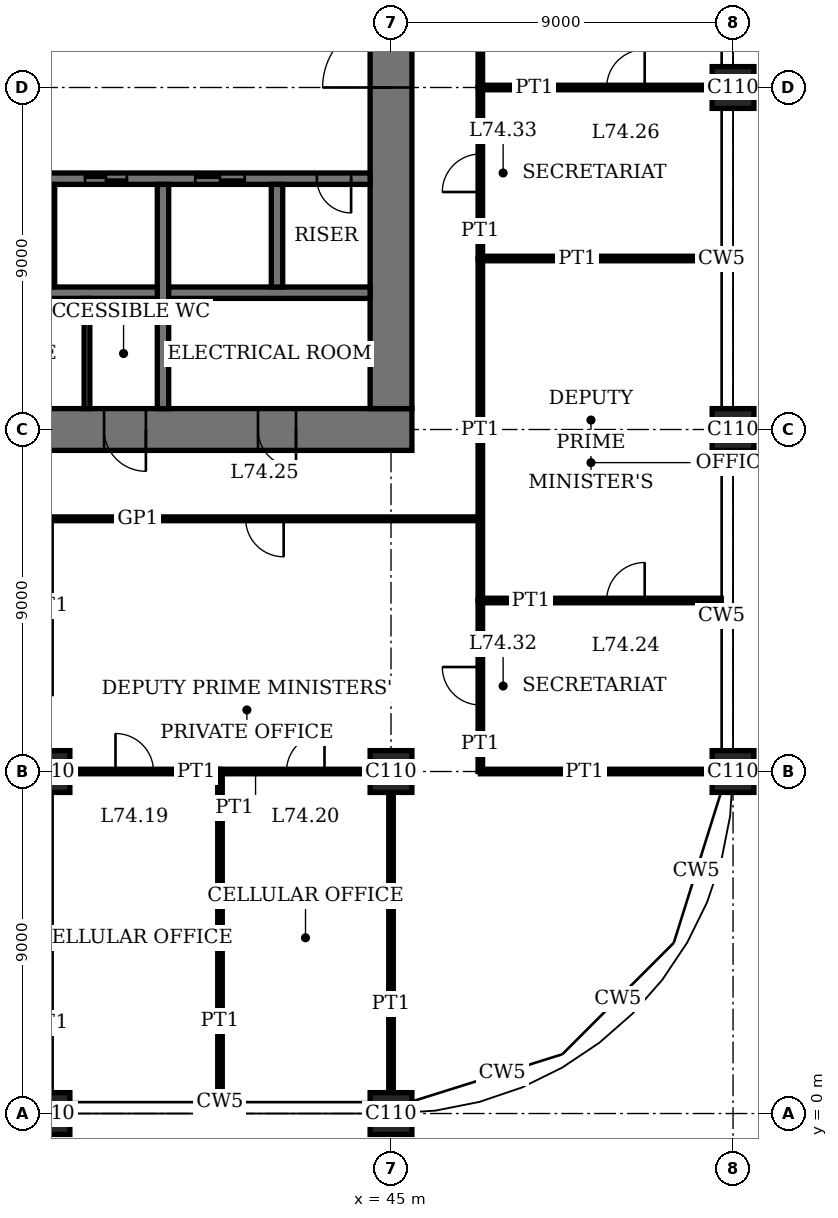
"""IFC4 building model, lengths in metres.
Left out: names, types, materials, properties, quantities, classifications, styles, units other than length and angle.
Written with IfcOpenShell. Run it as: python <this file> out.ifc"""

import sys

from ifc_helpers import new_model, si_unit, direction, frame, frame_2d, origin, origin_2d, place, context, subcontext, project, spatial, rectangle, extrude, element, fill, save


model = new_model("IFC4")
c1 = context("Model", 3, precision=1e-05, world=origin(), true_north=direction((0.0, 1.0)))
c2 = subcontext(c1, "Body", "Model", "MODEL_VIEW")
j1 = project(units=[si_unit("LENGTHUNIT", "METRE"), si_unit("PLANEANGLEUNIT", "RADIAN")], contexts=[c1])
p1 = place(None, origin())
s1 = spatial("IfcSite", under=j1, at=p1, CompositionType="ELEMENT")
p2 = place(p1, origin())
s2 = spatial("IfcBuilding", under=s1, at=p2, CompositionType="ELEMENT")
p3 = place(p2, frame((0.0, 0.0, 303.4)))
s3 = spatial("IfcBuildingStorey", under=s2, at=p3, CompositionType="ELEMENT", Elevation=303.4)
for number, where, z_axis, x_axis in (
    (1, (36.0, 0.0, 0.0), (0.0, 0.0, 1.0), (1.0, 0.0, 0.0)),
    (2, (36.0, 9.0, 0.0), (0.0, 0.0, 1.0), (1.0, 0.0, 0.0)),
    (3, (45.0, 0.0, 0.0), (0.0, 0.0, 1.0), (1.0, 0.0, 0.0)),
    (4, (45.0, 9.0, 0.0), (0.0, 0.0, 1.0), (1.0, 0.0, 0.0)),
    (5, (54.0, 9.0, 0.0), (0.0, 0.0, 1.0), (1.0, 0.0, 0.0)),
    (6, (54.0, 18.0, 0.0), (0.0, 0.0, 1.0), (1.0, 0.0, 0.0)),
    (7, (54.0, 27.0, 0.0), (0.0, 0.0, 1.0), (1.0, 0.0, 0.0)),
):
    element("IfcColumn", number, at=place(p3, frame(where, z_axis=z_axis, x_axis=x_axis)), inside=s3, PredefinedType="COLUMN", context=c2, shape_type="SweptSolid", body=[
        extrude(rectangle(XDim=1.1, YDim=1.1, at=origin_2d()), origin(), (0.0, 0.0, 1.0), 4.0),
    ])
p4 = place(p3, frame((17.45, 18.0, 0.0), z_axis=(0.0, 0.0, 1.0), x_axis=(1.0, 0.0, 0.0)))
e8 = element("IfcWall", 8, at=p4, inside=s3, PredefinedType="SHEAR", context=c2, shape_type="SweptSolid", body=[
    extrude(rectangle(XDim=28.1, YDim=1.1, at=frame_2d((14.05, 0.0))), origin(), (0.0, 0.0, 1.0), 4.0),
])
p5 = place(p4, frame((11.55, 0.0, 0.0)))
e9 = element("IfcOpeningElement", 9, at=p5, cuts=e8, PredefinedType="OPENING", context=c2, shape_type="SweptSolid", body=[
    extrude(rectangle(XDim=1.0, YDim=2.4, at=frame_2d((0.5, 1.2))), frame((0.0, 0.56, 0.0), z_axis=(0.0, -1.0, 0.0), x_axis=(1.0, 0.0, 0.0)), (0.0, 0.0, 1.0), 1.12),
])
p6 = place(p4, frame((16.55, 0.0, 0.0)))
e10 = element("IfcOpeningElement", 10, at=p6, cuts=e8, PredefinedType="OPENING", context=c2, shape_type="SweptSolid", body=[
    extrude(rectangle(XDim=1.0, YDim=2.4, at=frame_2d((0.5, 1.2))), frame((0.0, 0.56, 0.0), z_axis=(0.0, -1.0, 0.0), x_axis=(1.0, 0.0, 0.0)), (0.0, 0.0, 1.0), 1.12),
])
p7 = place(p4, frame((20.0, 0.0, 0.0)))
e11 = element("IfcOpeningElement", 11, at=p7, cuts=e8, PredefinedType="OPENING", context=c2, shape_type="SweptSolid", body=[
    extrude(rectangle(XDim=1.1, YDim=2.4, at=frame_2d((0.55, 1.2))), frame((0.0, 0.56, 0.0), z_axis=(0.0, -1.0, 0.0), x_axis=(1.0, 0.0, 0.0)), (0.0, 0.0, 1.0), 1.12),
])
p8 = place(p4, frame((24.05, 0.0, 0.0)))
e12 = element("IfcOpeningElement", 12, at=p8, cuts=e8, PredefinedType="OPENING", context=c2, shape_type="SweptSolid", body=[
    extrude(rectangle(XDim=1.0, YDim=2.4, at=frame_2d((0.5, 1.2))), frame((0.0, 0.56, 0.0), z_axis=(0.0, -1.0, 0.0), x_axis=(1.0, 0.0, 0.0)), (0.0, 0.0, 1.0), 1.12),
])
p9 = place(p3, frame((45.0, 18.55, 0.0), z_axis=(0.0, 0.0, 1.0), x_axis=(0.0, 1.0, 0.0)))
e13 = element("IfcWall", 13, at=p9, inside=s3, PredefinedType="SHEAR", context=c2, shape_type="SweptSolid", body=[
    extrude(rectangle(XDim=16.9, YDim=1.1, at=frame_2d((8.45, 0.0))), origin(), (0.0, 0.0, 1.0), 4.0),
])
p10 = place(p9, frame((8.45, 0.0, 0.0)))
e14 = element("IfcOpeningElement", 14, at=p10, cuts=e13, PredefinedType="OPENING", context=c2, shape_type="SweptSolid", body=[
    extrude(rectangle(XDim=1.8, YDim=2.4, at=frame_2d((0.9, 1.2))), frame((0.0, 0.56, 0.0), z_axis=(0.0, -1.0, 0.0), x_axis=(1.0, 0.0, 0.0)), (0.0, 0.0, 1.0), 1.12),
])
p11 = place(p3, frame((18.55, 24.6, 0.0), z_axis=(0.0, 0.0, 1.0), x_axis=(1.0, 0.0, 0.0)))
e15 = element("IfcWall", 15, at=p11, inside=s3, PredefinedType="SHEAR", context=c2, shape_type="SweptSolid", body=[
    extrude(rectangle(XDim=25.9, YDim=0.3, at=frame_2d((12.95, 0.0))), origin(), (0.0, 0.0, 1.0), 4.0),
])
p12 = place(p11, frame((4.95, 0.0, 0.0)))
e16 = element("IfcOpeningElement", 16, at=p12, cuts=e15, PredefinedType="OPENING", context=c2, shape_type="SweptSolid", body=[
    extrude(rectangle(XDim=1.0, YDim=2.4, at=frame_2d((0.5, 1.2))), frame((0.0, 0.16, 0.0), z_axis=(0.0, -1.0, 0.0), x_axis=(1.0, 0.0, 0.0)), (0.0, 0.0, 1.0), 0.32),
])
p13 = place(p11, frame((24.5, 0.0, 0.0)))
e17 = element("IfcOpeningElement", 17, at=p13, cuts=e15, PredefinedType="OPENING", context=c2, shape_type="SweptSolid", body=[
    extrude(rectangle(XDim=0.9, YDim=2.1, at=frame_2d((0.45, 1.05))), frame((0.0, 0.16, 0.0), z_axis=(0.0, -1.0, 0.0), x_axis=(1.0, 0.0, 0.0)), (0.0, 0.0, 1.0), 0.32),
])
p14 = place(p11, frame((9.4, 0.0, 0.0)))
e18 = element("IfcOpeningElement", 18, at=p14, cuts=e15, PredefinedType="OPENING", context=c2, shape_type="SweptSolid", body=[
    extrude(rectangle(XDim=1.1, YDim=2.4, at=frame_2d((0.55, 1.2))), frame((0.0, 0.16, 0.0), z_axis=(0.0, -1.0, 0.0), x_axis=(1.0, 0.0, 0.0)), (0.0, 0.0, 1.0), 0.32),
])
p15 = place(p11, frame((12.4, 0.0, 0.0)))
e19 = element("IfcOpeningElement", 19, at=p15, cuts=e15, PredefinedType="OPENING", context=c2, shape_type="SweptSolid", body=[
    extrude(rectangle(XDim=1.1, YDim=2.4, at=frame_2d((0.55, 1.2))), frame((0.0, 0.16, 0.0), z_axis=(0.0, -1.0, 0.0), x_axis=(1.0, 0.0, 0.0)), (0.0, 0.0, 1.0), 0.32),
])
p16 = place(p11, frame((15.4, 0.0, 0.0)))
e20 = element("IfcOpeningElement", 20, at=p16, cuts=e15, PredefinedType="OPENING", context=c2, shape_type="SweptSolid", body=[
    extrude(rectangle(XDim=1.1, YDim=2.4, at=frame_2d((0.55, 1.2))), frame((0.0, 0.16, 0.0), z_axis=(0.0, -1.0, 0.0), x_axis=(1.0, 0.0, 0.0)), (0.0, 0.0, 1.0), 0.32),
])
p17 = place(p11, frame((18.4, 0.0, 0.0)))
e21 = element("IfcOpeningElement", 21, at=p17, cuts=e15, PredefinedType="OPENING", context=c2, shape_type="SweptSolid", body=[
    extrude(rectangle(XDim=1.1, YDim=2.4, at=frame_2d((0.55, 1.2))), frame((0.0, 0.16, 0.0), z_axis=(0.0, -1.0, 0.0), x_axis=(1.0, 0.0, 0.0)), (0.0, 0.0, 1.0), 0.32),
])
p18 = place(p11, frame((21.3, 0.0, 0.0)))
e22 = element("IfcOpeningElement", 22, at=p18, cuts=e15, PredefinedType="OPENING", context=c2, shape_type="SweptSolid", body=[
    extrude(rectangle(XDim=1.3, YDim=2.4, at=frame_2d((0.65, 1.2))), frame((0.0, 0.16, 0.0), z_axis=(0.0, -1.0, 0.0), x_axis=(1.0, 0.0, 0.0)), (0.0, 0.0, 1.0), 0.32),
])
p19 = place(p3, frame((27.15, 21.6, 0.0), z_axis=(0.0, 0.0, 1.0), x_axis=(1.0, 0.0, 0.0)))
e23 = element("IfcWall", 23, at=p19, inside=s3, PredefinedType="SHEAR", context=c2, shape_type="SweptSolid", body=[
    extrude(rectangle(XDim=17.3, YDim=0.3, at=frame_2d((8.65, 0.0))), origin(), (0.0, 0.0, 1.0), 4.0),
])
p20 = place(p3, frame((36.0, 21.75, 0.0), z_axis=(0.0, 0.0, 1.0), x_axis=(0.0, 1.0, 0.0)))
e24 = element("IfcWall", 24, at=p20, inside=s3, PredefinedType="SHEAR", context=c2, shape_type="SweptSolid", body=[
    extrude(rectangle(XDim=2.7, YDim=0.3, at=frame_2d((1.35, 0.0))), origin(), (0.0, 0.0, 1.0), 4.0),
])
p21 = place(p3, frame((39.0, 18.55, 0.0), z_axis=(0.0, 0.0, 1.0), x_axis=(0.0, 1.0, 0.0)))
e25 = element("IfcWall", 25, at=p21, inside=s3, PredefinedType="SHEAR", context=c2, shape_type="SweptSolid", body=[
    extrude(rectangle(XDim=5.9, YDim=0.3, at=frame_2d((2.95, 0.0))), origin(), (0.0, 0.0, 1.0), 4.0),
])
p22 = place(p3, frame((42.0, 21.75, 0.0), z_axis=(0.0, 0.0, 1.0), x_axis=(0.0, 1.0, 0.0)))
e26 = element("IfcWall", 26, at=p22, inside=s3, PredefinedType="SHEAR", context=c2, shape_type="SweptSolid", body=[
    extrude(rectangle(XDim=2.7, YDim=0.3, at=frame_2d((1.35, 0.0))), origin(), (0.0, 0.0, 1.0), 4.0),
])
p23 = place(p3, frame((47.35, 9.0, 0.0), z_axis=(0.0, 0.0, 1.0), x_axis=(1.0, 0.0, 0.0)))
e27 = element("IfcWall", 27, at=p23, inside=s3, PredefinedType="PARTITIONING", context=c2, shape_type="SweptSolid", body=[
    extrude(rectangle(XDim=6.1, YDim=0.12, at=frame_2d((3.05, 0.0))), origin(), (0.0, 0.0, 1.0), 3.05),
])
p24 = place(p3, frame((36.55, 9.0, 0.0), z_axis=(0.0, 0.0, 1.0), x_axis=(1.0, 0.0, 0.0)))
e28 = element("IfcWall", 28, at=p24, inside=s3, PredefinedType="PARTITIONING", context=c2, shape_type="SweptSolid", body=[
    extrude(rectangle(XDim=3.95, YDim=0.12, at=frame_2d((1.975, 0.0))), origin(), (0.0, 0.0, 1.0), 3.05),
])
p25 = place(p24, frame((1.2, 0.0, 0.0)))
e29 = element("IfcOpeningElement", 29, at=p25, cuts=e28, PredefinedType="OPENING", context=c2, shape_type="SweptSolid", body=[
    extrude(rectangle(XDim=1.0, YDim=2.4, at=frame_2d((0.5, 1.2))), frame((0.0, 0.07, 0.0), z_axis=(0.0, -1.0, 0.0), x_axis=(1.0, 0.0, 0.0)), (0.0, 0.0, 1.0), 0.14),
])
p26 = place(p3, frame((40.5, 9.0, 0.0), z_axis=(0.0, 0.0, 1.0), x_axis=(1.0, 0.0, 0.0)))
e30 = element("IfcWall", 30, at=p26, inside=s3, PredefinedType="PARTITIONING", context=c2, shape_type="SweptSolid", body=[
    extrude(rectangle(XDim=3.95, YDim=0.12, at=frame_2d((1.975, 0.0))), origin(), (0.0, 0.0, 1.0), 3.05),
])
p27 = place(p26, frame((1.75, 0.0, 0.0)))
e31 = element("IfcOpeningElement", 31, at=p27, cuts=e30, PredefinedType="OPENING", context=c2, shape_type="SweptSolid", body=[
    extrude(rectangle(XDim=1.0, YDim=2.4, at=frame_2d((0.5, 1.2))), frame((0.0, 0.07, 0.0), z_axis=(0.0, -1.0, 0.0), x_axis=(1.0, 0.0, 0.0)), (0.0, 0.0, 1.0), 0.14),
])
p28 = place(p3, frame((47.35, 13.5, 0.0), z_axis=(0.0, 0.0, 1.0), x_axis=(1.0, 0.0, 0.0)))
e32 = element("IfcWall", 32, at=p28, inside=s3, PredefinedType="PARTITIONING", context=c2, shape_type="SweptSolid", body=[
    extrude(rectangle(XDim=6.34, YDim=0.12, at=frame_2d((3.17, 0.0))), origin(), (0.0, 0.0, 1.0), 3.1),
])
p29 = place(p28, frame((3.325, 0.0, 0.0)))
e33 = element("IfcOpeningElement", 33, at=p29, cuts=e32, PredefinedType="OPENING", context=c2, shape_type="SweptSolid", body=[
    extrude(rectangle(XDim=1.0, YDim=2.4, at=frame_2d((0.5, 1.2))), frame((0.0, 0.07, 0.0), z_axis=(0.0, -1.0, 0.0), x_axis=(1.0, 0.0, 0.0)), (0.0, 0.0, 1.0), 0.14),
])
p30 = place(p3, frame((36.01, 15.65, 0.0), z_axis=(0.0, 0.0, 1.0), x_axis=(1.0, 0.0, 0.0)))
e34 = element("IfcWall", 34, at=p30, inside=s3, PredefinedType="PARTITIONING", context=c2, shape_type="SweptSolid", body=[
    extrude(rectangle(XDim=11.33, YDim=0.1, at=frame_2d((5.665, 0.0))), origin(), (0.0, 0.0, 1.0), 3.75),
])
p31 = place(p30, frame((5.165, 0.0, 0.0)))
e35 = element("IfcOpeningElement", 35, at=p31, cuts=e34, PredefinedType="OPENING", context=c2, shape_type="SweptSolid", body=[
    extrude(rectangle(XDim=1.0, YDim=2.4, at=frame_2d((0.5, 1.2))), frame((0.0, 0.06, 0.0), z_axis=(0.0, -1.0, 0.0), x_axis=(1.0, 0.0, 0.0)), (0.0, 0.0, 1.0), 0.12),
])
p32 = place(p3, frame((47.35, 22.5, 0.0), z_axis=(0.0, 0.0, 1.0), x_axis=(1.0, 0.0, 0.0)))
e36 = element("IfcWall", 36, at=p32, inside=s3, PredefinedType="PARTITIONING", context=c2, shape_type="SweptSolid", body=[
    extrude(rectangle(XDim=6.34, YDim=0.12, at=frame_2d((3.17, 0.0))), origin(), (0.0, 0.0, 1.0), 3.1),
])
p33 = place(p3, frame((47.35, 27.0, 0.0), z_axis=(0.0, 0.0, 1.0), x_axis=(1.0, 0.0, 0.0)))
e37 = element("IfcWall", 37, at=p33, inside=s3, PredefinedType="PARTITIONING", context=c2, shape_type="SweptSolid", body=[
    extrude(rectangle(XDim=6.1, YDim=0.12, at=frame_2d((3.05, 0.0))), origin(), (0.0, 0.0, 1.0), 3.05),
])
p34 = place(p33, frame((3.325, 0.0, 0.0)))
e38 = element("IfcOpeningElement", 38, at=p34, cuts=e37, PredefinedType="OPENING", context=c2, shape_type="SweptSolid", body=[
    extrude(rectangle(XDim=1.0, YDim=2.4, at=frame_2d((0.5, 1.2))), frame((0.0, 0.07, 0.0), z_axis=(0.0, -1.0, 0.0), x_axis=(1.0, 0.0, 0.0)), (0.0, 0.0, 1.0), 0.14),
])
p35 = place(p3, frame((40.5, 0.31, 0.0), z_axis=(0.0, 0.0, 1.0), x_axis=(0.0, 1.0, 0.0)))
e39 = element("IfcWall", 39, at=p35, inside=s3, PredefinedType="PARTITIONING", context=c2, shape_type="SweptSolid", body=[
    extrude(rectangle(XDim=8.69, YDim=0.12, at=frame_2d((4.345, 0.0))), origin(), (0.0, 0.0, 1.0), 3.75),
])
p36 = place(p3, frame((45.0, 0.55, 0.0), z_axis=(0.0, 0.0, 1.0), x_axis=(0.0, 1.0, 0.0)))
e40 = element("IfcWall", 40, at=p36, inside=s3, PredefinedType="PARTITIONING", context=c2, shape_type="SweptSolid", body=[
    extrude(rectangle(XDim=7.9, YDim=0.12, at=frame_2d((3.95, 0.0))), origin(), (0.0, 0.0, 1.0), 3.05),
])
p37 = place(p3, frame((47.35, 9.0, 0.0), z_axis=(0.0, 0.0, 1.0), x_axis=(0.0, 1.0, 0.0)))
e41 = element("IfcWall", 41, at=p37, inside=s3, PredefinedType="PARTITIONING", context=c2, shape_type="SweptSolid", body=[
    extrude(rectangle(XDim=4.5, YDim=0.12, at=frame_2d((2.25, 0.0))), origin(), (0.0, 0.0, 1.0), 3.75),
])
p38 = place(p37, frame((1.75, 0.0, 0.0)))
e42 = element("IfcOpeningElement", 42, at=p38, cuts=e41, PredefinedType="OPENING", context=c2, shape_type="SweptSolid", body=[
    extrude(rectangle(XDim=1.0, YDim=2.4, at=frame_2d((0.5, 1.2))), frame((0.0, 0.07, 0.0), z_axis=(0.0, -1.0, 0.0), x_axis=(1.0, 0.0, 0.0)), (0.0, 0.0, 1.0), 0.14),
])
p39 = place(p3, frame((47.35, 13.5, 0.0), z_axis=(0.0, 0.0, 1.0), x_axis=(0.0, 1.0, 0.0)))
e43 = element("IfcWall", 43, at=p39, inside=s3, PredefinedType="PARTITIONING", context=c2, shape_type="SweptSolid", body=[
    extrude(rectangle(XDim=9.0, YDim=0.12, at=frame_2d((4.5, 0.0))), origin(), (0.0, 0.0, 1.0), 3.75),
])
p40 = place(p3, frame((47.35, 22.5, 0.0), z_axis=(0.0, 0.0, 1.0), x_axis=(0.0, 1.0, 0.0)))
e44 = element("IfcWall", 44, at=p40, inside=s3, PredefinedType="PARTITIONING", context=c2, shape_type="SweptSolid", body=[
    extrude(rectangle(XDim=4.5, YDim=0.12, at=frame_2d((2.25, 0.0))), origin(), (0.0, 0.0, 1.0), 3.75),
])
p41 = place(p40, frame((1.75, 0.0, 0.0)))
e45 = element("IfcOpeningElement", 45, at=p41, cuts=e44, PredefinedType="OPENING", context=c2, shape_type="SweptSolid", body=[
    extrude(rectangle(XDim=1.0, YDim=2.4, at=frame_2d((0.5, 1.2))), frame((0.0, 0.07, 0.0), z_axis=(0.0, -1.0, 0.0), x_axis=(1.0, 0.0, 0.0)), (0.0, 0.0, 1.0), 0.14),
])
p42 = place(p3, frame((47.35, 27.0, 0.0), z_axis=(0.0, 0.0, 1.0), x_axis=(0.0, 1.0, 0.0)))
e46 = element("IfcWall", 46, at=p42, inside=s3, PredefinedType="PARTITIONING", context=c2, shape_type="SweptSolid", body=[
    extrude(rectangle(XDim=9.0, YDim=0.12, at=frame_2d((4.5, 0.0))), origin(), (0.0, 0.0, 1.0), 3.75),
])
p43 = place(p3, frame((37.0, 18.55, 0.0), z_axis=(0.0, 0.0, 1.0), x_axis=(0.0, 1.0, 0.0)))
e47 = element("IfcWall", 47, at=p43, inside=s3, PredefinedType="PARTITIONING", context=c2, shape_type="SweptSolid", body=[
    extrude(rectangle(XDim=2.9, YDim=0.15, at=frame_2d((1.45, 0.0))), origin(), (0.0, 0.0, 1.0), 3.75),
])
p44 = place(p10, origin())
e48 = element("IfcDoor", 48, at=p44, inside=s3, OperationType="DOUBLE_DOOR_DOUBLE_SWING", PredefinedType="DOOR", context=c2, shape_type="SweptSolid", body=[
    extrude(rectangle(XDim=1.8, YDim=2.4, at=frame_2d((0.9, 1.2))), frame((0.0, 0.03, 0.0), z_axis=(0.0, -1.0, 0.0), x_axis=(1.0, 0.0, 0.0)), (0.0, 0.0, 1.0), 0.06),
    extrude(rectangle(XDim=0.04, YDim=2.4, at=frame_2d((0.02, 1.2))), frame((0.0, 0.55, 0.0), z_axis=(0.0, -1.0, 0.0), x_axis=(1.0, 0.0, 0.0)), (0.0, 0.0, 1.0), 1.1),
    extrude(rectangle(XDim=0.04, YDim=2.4, at=frame_2d((1.78, 1.2))), frame((0.0, 0.55, 0.0), z_axis=(0.0, -1.0, 0.0), x_axis=(1.0, 0.0, 0.0)), (0.0, 0.0, 1.0), 1.1),
    extrude(rectangle(XDim=1.8, YDim=0.04, at=frame_2d((0.9, 2.38))), frame((0.0, 0.55, 0.0), z_axis=(0.0, -1.0, 0.0), x_axis=(1.0, 0.0, 0.0)), (0.0, 0.0, 1.0), 1.1),
])
fill(e14, e48)
p45 = place(p7, origin())
e49 = element("IfcDoor", 49, at=p45, inside=s3, OperationType="SINGLE_SWING_RIGHT", PredefinedType="DOOR", context=c2, shape_type="SweptSolid", body=[
    extrude(rectangle(XDim=1.1, YDim=2.4, at=frame_2d((0.55, 1.2))), frame((0.0, 0.025, 0.0), z_axis=(0.0, -1.0, 0.0), x_axis=(1.0, 0.0, 0.0)), (0.0, 0.0, 1.0), 0.05),
    extrude(rectangle(XDim=0.04, YDim=2.4, at=frame_2d((0.02, 1.2))), frame((0.0, 0.44, 0.0), z_axis=(0.0, -1.0, 0.0), x_axis=(1.0, 0.0, 0.0)), (0.0, 0.0, 1.0), 0.88),
    extrude(rectangle(XDim=0.04, YDim=2.4, at=frame_2d((1.08, 1.2))), frame((0.0, 0.44, 0.0), z_axis=(0.0, -1.0, 0.0), x_axis=(1.0, 0.0, 0.0)), (0.0, 0.0, 1.0), 0.88),
    extrude(rectangle(XDim=1.1, YDim=0.04, at=frame_2d((0.55, 2.38))), frame((0.0, 0.44, 0.0), z_axis=(0.0, -1.0, 0.0), x_axis=(1.0, 0.0, 0.0)), (0.0, 0.0, 1.0), 0.88),
])
fill(e11, e49)
p46 = place(p8, origin())
e50 = element("IfcDoor", 50, at=p46, inside=s3, OperationType="SINGLE_SWING_RIGHT", PredefinedType="DOOR", context=c2, shape_type="SweptSolid", body=[
    extrude(rectangle(XDim=1.0, YDim=2.4, at=frame_2d((0.5, 1.2))), frame((0.0, 0.025, 0.0), z_axis=(0.0, -1.0, 0.0), x_axis=(1.0, 0.0, 0.0)), (0.0, 0.0, 1.0), 0.05),
    extrude(rectangle(XDim=0.04, YDim=2.4, at=frame_2d((0.02, 1.2))), frame((0.0, 0.4, 0.0), z_axis=(0.0, -1.0, 0.0), x_axis=(1.0, 0.0, 0.0)), (0.0, 0.0, 1.0), 0.8),
    extrude(rectangle(XDim=0.04, YDim=2.4, at=frame_2d((0.98, 1.2))), frame((0.0, 0.4, 0.0), z_axis=(0.0, -1.0, 0.0), x_axis=(1.0, 0.0, 0.0)), (0.0, 0.0, 1.0), 0.8),
    extrude(rectangle(XDim=1.0, YDim=0.04, at=frame_2d((0.5, 2.38))), frame((0.0, 0.4, 0.0), z_axis=(0.0, -1.0, 0.0), x_axis=(1.0, 0.0, 0.0)), (0.0, 0.0, 1.0), 0.8),
])
fill(e12, e50)
p47 = place(p13, origin())
e51 = element("IfcDoor", 51, at=p47, inside=s3, OperationType="SINGLE_SWING_RIGHT", PredefinedType="DOOR", context=c2, shape_type="SweptSolid", body=[
    extrude(rectangle(XDim=0.9, YDim=2.1, at=frame_2d((0.45, 1.05))), frame((0.0, 0.03, 0.0), z_axis=(0.0, -1.0, 0.0), x_axis=(1.0, 0.0, 0.0)), (0.0, 0.0, 1.0), 0.06),
])
fill(e17, e51)
p48 = place(p25, origin())
e52 = element("IfcDoor", 52, at=p48, inside=s3, OperationType="SINGLE_SWING_RIGHT", PredefinedType="DOOR", context=c2, shape_type="SweptSolid", body=[
    extrude(rectangle(XDim=1.0, YDim=2.4, at=frame_2d((0.5, 1.2))), frame((0.0, 0.025, 0.0), z_axis=(0.0, -1.0, 0.0), x_axis=(1.0, 0.0, 0.0)), (0.0, 0.0, 1.0), 0.05),
])
fill(e29, e52)
p49 = place(p27, origin())
e53 = element("IfcDoor", 53, at=p49, inside=s3, OperationType="SINGLE_SWING_LEFT", PredefinedType="DOOR", context=c2, shape_type="SweptSolid", body=[
    extrude(rectangle(XDim=1.0, YDim=2.4, at=frame_2d((0.5, 1.2))), frame((0.0, 0.025, 0.0), z_axis=(0.0, -1.0, 0.0), x_axis=(1.0, 0.0, 0.0)), (0.0, 0.0, 1.0), 0.05),
])
fill(e31, e53)
p50 = place(p29, origin())
e54 = element("IfcDoor", 54, at=p50, inside=s3, OperationType="SINGLE_SWING_LEFT", PredefinedType="DOOR", context=c2, shape_type="SweptSolid", body=[
    extrude(rectangle(XDim=1.0, YDim=2.4, at=frame_2d((0.5, 1.2))), frame((0.0, 0.025, 0.0), z_axis=(0.0, -1.0, 0.0), x_axis=(1.0, 0.0, 0.0)), (0.0, 0.0, 1.0), 0.05),
])
fill(e33, e54)
p51 = place(p31, origin())
e55 = element("IfcDoor", 55, at=p51, inside=s3, OperationType="SINGLE_SWING_RIGHT", PredefinedType="DOOR", context=c2, shape_type="SweptSolid", body=[
    extrude(rectangle(XDim=1.0, YDim=2.4, at=frame_2d((0.5, 1.2))), frame((0.0, 0.02, 0.0), z_axis=(0.0, -1.0, 0.0), x_axis=(1.0, 0.0, 0.0)), (0.0, 0.0, 1.0), 0.04),
])
fill(e35, e55)
p52 = place(p34, origin())
e56 = element("IfcDoor", 56, at=p52, inside=s3, OperationType="SINGLE_SWING_LEFT", PredefinedType="DOOR", context=c2, shape_type="SweptSolid", body=[
    extrude(rectangle(XDim=1.0, YDim=2.4, at=frame_2d((0.5, 1.2))), frame((0.0, 0.025, 0.0), z_axis=(0.0, -1.0, 0.0), x_axis=(1.0, 0.0, 0.0)), (0.0, 0.0, 1.0), 0.05),
])
fill(e38, e56)
p53 = place(p38, origin())
e57 = element("IfcDoor", 57, at=p53, inside=s3, OperationType="SINGLE_SWING_LEFT", PredefinedType="DOOR", context=c2, shape_type="SweptSolid", body=[
    extrude(rectangle(XDim=1.0, YDim=2.4, at=frame_2d((0.5, 1.2))), frame((0.0, 0.025, 0.0), z_axis=(0.0, -1.0, 0.0), x_axis=(1.0, 0.0, 0.0)), (0.0, 0.0, 1.0), 0.05),
])
fill(e42, e57)
p54 = place(p41, origin())
e58 = element("IfcDoor", 58, at=p54, inside=s3, OperationType="SINGLE_SWING_RIGHT", PredefinedType="DOOR", context=c2, shape_type="SweptSolid", body=[
    extrude(rectangle(XDim=1.0, YDim=2.4, at=frame_2d((0.5, 1.2))), frame((0.0, 0.025, 0.0), z_axis=(0.0, -1.0, 0.0), x_axis=(1.0, 0.0, 0.0)), (0.0, 0.0, 1.0), 0.05),
])
fill(e45, e58)
p55 = place(p17, origin())
e59 = element("IfcDoor", 59, at=p55, inside=s3, OperationType="DOUBLE_DOOR_SLIDING", PredefinedType="DOOR", context=c2, shape_type="SweptSolid", body=[
    extrude(rectangle(XDim=1.1, YDim=2.4, at=frame_2d((0.55, 1.2))), frame((0.0, 0.02, 0.0), z_axis=(0.0, -1.0, 0.0), x_axis=(1.0, 0.0, 0.0)), (0.0, 0.0, 1.0), 0.04),
])
fill(e21, e59)
p56 = place(p18, origin())
e60 = element("IfcDoor", 60, at=p56, inside=s3, OperationType="DOUBLE_DOOR_SLIDING", PredefinedType="DOOR", context=c2, shape_type="SweptSolid", body=[
    extrude(rectangle(XDim=1.3, YDim=2.4, at=frame_2d((0.65, 1.2))), frame((0.0, 0.02, 0.0), z_axis=(0.0, -1.0, 0.0), x_axis=(1.0, 0.0, 0.0)), (0.0, 0.0, 1.0), 0.04),
])
fill(e22, e60)
save(model, sys.argv[1])
